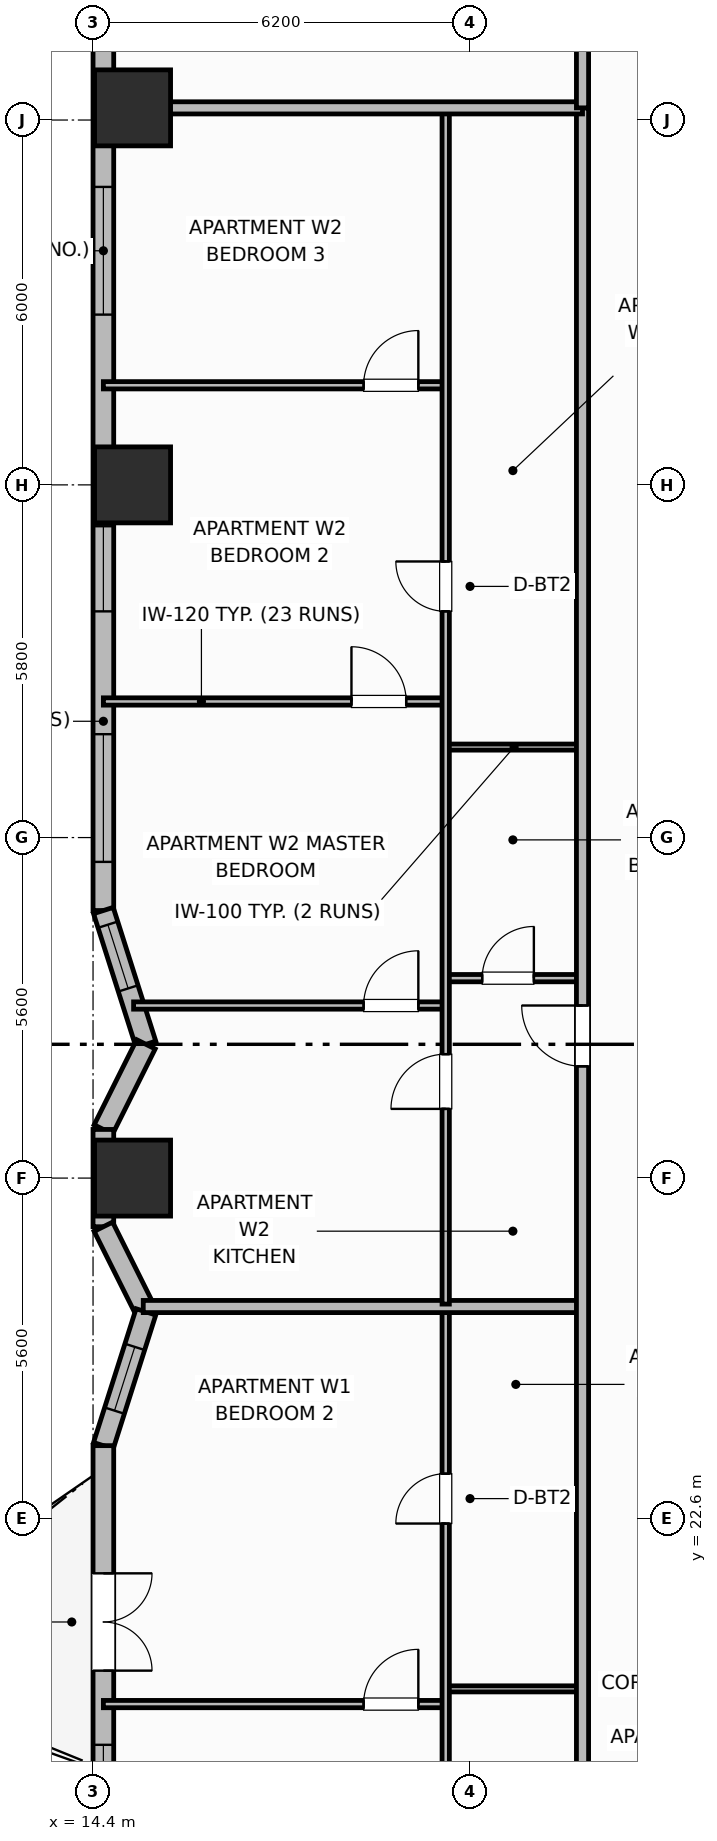
"""IFC4 building model, lengths in metres.
Left out: names, types, materials, properties, quantities, classifications, styles, units other than length and angle.
Written with IfcOpenShell. Run it as: python <this file> out.ifc"""

import sys

from ifc_helpers import new_model, si_unit, direction, frame, frame_2d, origin, origin_2d, place, context, subcontext, project, spatial, rectangle, extrude, element, fill, save


model = new_model("IFC4")
c1 = context("Model", 3, precision=1e-05, world=origin(), true_north=direction((0.0, 1.0)))
c2 = subcontext(c1, "Body", "Model", "MODEL_VIEW")
j1 = project(units=[si_unit("LENGTHUNIT", "METRE"), si_unit("PLANEANGLEUNIT", "RADIAN")], contexts=[c1])
p1 = place(None, origin())
s1 = spatial("IfcSite", under=j1, at=p1, CompositionType="ELEMENT")
p2 = place(p1, origin())
s2 = spatial("IfcBuilding", under=s1, at=p2, CompositionType="ELEMENT")
p3 = place(p2, frame((0.0, 0.0, 62.1)))
s3 = spatial("IfcBuildingStorey", under=s2, at=p3, CompositionType="ELEMENT", Elevation=62.1)
for number, where, z_axis, x_axis in (
    (1, (15.05, 28.2, 0.0), (0.0, 0.0, 1.0), (1.0, 0.0, 0.0)),
    (2, (15.05, 39.6, 0.0), (0.0, 0.0, 1.0), (1.0, 0.0, 0.0)),
    (3, (15.05, 45.8, 0.0), (0.0, 0.0, 1.0), (1.0, 0.0, 0.0)),
):
    element("IfcColumn", number, at=place(p3, frame(where, z_axis=z_axis, x_axis=x_axis)), inside=s3, PredefinedType="COLUMN", context=c2, shape_type="SweptSolid", body=[
        extrude(rectangle(XDim=1.25, YDim=1.25, at=origin_2d()), origin(), (0.0, 0.0, 1.0), 3.7),
    ])
p4 = place(p3, frame((14.57, 47.4, 0.0), z_axis=(0.0, 0.0, 1.0), x_axis=(0.0, -1.0, 0.0)))
e4 = element("IfcWall", 4, at=p4, inside=s3, PredefinedType="SOLIDWALL", context=c2, shape_type="SweptSolid", body=[
    extrude(rectangle(XDim=14.8, YDim=0.34, at=frame_2d((7.4, 0.0))), origin(), (0.0, 0.0, 1.0), 2.7),
])
p5 = place(p4, frame((2.9, 0.0, 0.68)))
e5 = element("IfcOpeningElement", 5, at=p5, cuts=e4, PredefinedType="OPENING", context=c2, shape_type="SweptSolid", body=[
    extrude(rectangle(XDim=2.1, YDim=1.9, at=frame_2d((1.05, 0.95))), frame((0.0, 0.18, 0.0), z_axis=(0.0, -1.0, 0.0), x_axis=(1.0, 0.0, 0.0)), (0.0, 0.0, 1.0), 0.36),
])
p6 = place(p4, frame((8.48, 0.0, 0.69)))
e6 = element("IfcOpeningElement", 6, at=p6, cuts=e4, PredefinedType="OPENING", context=c2, shape_type="SweptSolid", body=[
    extrude(rectangle(XDim=1.4, YDim=1.85, at=frame_2d((0.7, 0.925))), frame((0.0, 0.18, 0.0), z_axis=(0.0, -1.0, 0.0), x_axis=(1.0, 0.0, 0.0)), (0.0, 0.0, 1.0), 0.36),
])
p7 = place(p4, frame((11.9, 0.0, 0.68)))
e7 = element("IfcOpeningElement", 7, at=p7, cuts=e4, PredefinedType="OPENING", context=c2, shape_type="SweptSolid", body=[
    extrude(rectangle(XDim=2.1, YDim=1.9, at=frame_2d((1.05, 0.95))), frame((0.0, 0.18, 0.0), z_axis=(0.0, -1.0, 0.0), x_axis=(1.0, 0.0, 0.0)), (0.0, 0.0, 1.0), 0.36),
])
p8 = place(p3, frame((14.57, 32.6, 0.0), z_axis=(0.0, 0.0, 1.0), x_axis=(0.303160011437, -0.952939666225, 0.0)))
e8 = element("IfcWall", 8, at=p8, inside=s3, PredefinedType="SOLIDWALL", context=c2, shape_type="SweptSolid", body=[
    extrude(rectangle(XDim=2.309, YDim=0.34, at=frame_2d((1.154, 0.0))), origin(), (0.0, 0.0, 1.0), 2.7),
])
p9 = place(p8, frame((0.244, 0.0, 0.89)))
e9 = element("IfcOpeningElement", 9, at=p9, cuts=e8, PredefinedType="OPENING", context=c2, shape_type="SweptSolid", body=[
    extrude(rectangle(XDim=1.1, YDim=1.65, at=frame_2d((0.55, 0.825))), frame((0.0, 0.18, 0.0), z_axis=(0.0, -1.0, 0.0), x_axis=(1.0, 0.0, 0.0)), (0.0, 0.0, 1.0), 0.36),
])
p10 = place(p3, frame((15.27, 30.4, 0.0), z_axis=(0.0, 0.0, 1.0), x_axis=(-0.4472135955, -0.894427191, 0.0)))
e10 = element("IfcWall", 10, at=p10, inside=s3, PredefinedType="SOLIDWALL", context=c2, shape_type="SweptSolid", body=[
    extrude(rectangle(XDim=1.565, YDim=0.34, at=frame_2d((0.783, 0.0))), origin(), (0.0, 0.0, 1.0), 2.7),
])
p11 = place(p3, frame((14.57, 29.0, 0.0), z_axis=(0.0, 0.0, 1.0), x_axis=(0.0, -1.0, 0.0)))
e11 = element("IfcWall", 11, at=p11, inside=s3, PredefinedType="SOLIDWALL", context=c2, shape_type="SweptSolid", body=[
    extrude(rectangle(XDim=1.6, YDim=0.34, at=frame_2d((0.8, 0.0))), origin(), (0.0, 0.0, 1.0), 2.7),
])
p12 = place(p3, frame((14.57, 27.4, 0.0), z_axis=(0.0, 0.0, 1.0), x_axis=(0.4472135955, -0.894427191, 0.0)))
e12 = element("IfcWall", 12, at=p12, inside=s3, PredefinedType="SOLIDWALL", context=c2, shape_type="SweptSolid", body=[
    extrude(rectangle(XDim=1.565, YDim=0.34, at=frame_2d((0.783, 0.0))), origin(), (0.0, 0.0, 1.0), 2.7),
])
p13 = place(p3, frame((15.27, 26.0, 0.0), z_axis=(0.0, 0.0, 1.0), x_axis=(-0.303190562272, -0.952929946507, 0.0)))
e13 = element("IfcWall", 13, at=p13, inside=s3, PredefinedType="SOLIDWALL", context=c2, shape_type="SweptSolid", body=[
    extrude(rectangle(XDim=2.309, YDim=0.34, at=frame_2d((1.154, 0.0))), origin(), (0.0, 0.0, 1.0), 2.7),
])
p14 = place(p13, frame((0.604, 0.0, 0.89)))
e14 = element("IfcOpeningElement", 14, at=p14, cuts=e13, PredefinedType="OPENING", context=c2, shape_type="SweptSolid", body=[
    extrude(rectangle(XDim=1.1, YDim=1.65, at=frame_2d((0.55, 0.825))), frame((0.0, 0.18, 0.0), z_axis=(0.0, -1.0, 0.0), x_axis=(1.0, 0.0, 0.0)), (0.0, 0.0, 1.0), 0.36),
])
p15 = place(p3, frame((14.57, 23.8, 0.0), z_axis=(0.0, 0.0, 1.0), x_axis=(0.0, -1.0, 0.0)))
e15 = element("IfcWall", 15, at=p15, inside=s3, PredefinedType="SOLIDWALL", context=c2, shape_type="SweptSolid", body=[
    extrude(rectangle(XDim=14.8, YDim=0.34, at=frame_2d((7.4, 0.0))), origin(), (0.0, 0.0, 1.0), 2.7),
])
p16 = place(p15, frame((2.1, 0.0, 0.0)))
e16 = element("IfcOpeningElement", 16, at=p16, cuts=e15, PredefinedType="OPENING", context=c2, shape_type="SweptSolid", body=[
    extrude(rectangle(XDim=1.6, YDim=2.1, at=frame_2d((0.8, 1.05))), frame((0.0, 0.18, 0.0), z_axis=(0.0, -1.0, 0.0), x_axis=(1.0, 0.0, 0.0)), (0.0, 0.0, 1.0), 0.36),
])
p17 = place(p15, frame((4.92, 0.0, 0.69)))
e17 = element("IfcOpeningElement", 17, at=p17, cuts=e15, PredefinedType="OPENING", context=c2, shape_type="SweptSolid", body=[
    extrude(rectangle(XDim=1.4, YDim=1.85, at=frame_2d((0.7, 0.925))), frame((0.0, 0.18, 0.0), z_axis=(0.0, -1.0, 0.0), x_axis=(1.0, 0.0, 0.0)), (0.0, 0.0, 1.0), 0.36),
])
p18 = place(p15, frame((9.95, 0.0, 0.73)))
e18 = element("IfcOpeningElement", 18, at=p18, cuts=e15, PredefinedType="OPENING", context=c2, shape_type="SweptSolid", body=[
    extrude(rectangle(XDim=1.8, YDim=1.85, at=frame_2d((0.9, 0.925))), frame((0.0, 0.18, 0.0), z_axis=(0.0, -1.0, 0.0), x_axis=(1.0, 0.0, 0.0)), (0.0, 0.0, 1.0), 0.36),
])
p19 = place(p3, frame((20.2, 19.8, 0.0), z_axis=(0.0, 0.0, 1.0), x_axis=(1.0, 0.0, 0.0)))
e19 = element("IfcWall", 19, at=p19, inside=s3, PredefinedType="PARTITIONING", context=c2, shape_type="SweptSolid", body=[
    extrude(rectangle(XDim=2.25, YDim=0.1, at=frame_2d((1.125, 0.0))), origin(), (0.0, 0.0, 1.0), 2.53),
])
p20 = place(p3, frame((14.57, 19.55, 0.0), z_axis=(0.0, 0.0, 1.0), x_axis=(1.0, 0.0, 0.0)))
e20 = element("IfcWall", 20, at=p20, inside=s3, PredefinedType="PARTITIONING", context=c2, shape_type="SweptSolid", body=[
    extrude(rectangle(XDim=5.63, YDim=0.12, at=frame_2d((2.815, 0.0))), origin(), (0.0, 0.0, 1.0), 2.53),
])
p21 = place(p20, frame((4.28, 0.0, 0.0)))
e21 = element("IfcOpeningElement", 21, at=p21, cuts=e20, PredefinedType="OPENING", context=c2, shape_type="SweptSolid", body=[
    extrude(rectangle(XDim=0.9, YDim=2.1, at=frame_2d((0.45, 1.05))), frame((0.0, 0.07, 0.0), z_axis=(0.0, -1.0, 0.0), x_axis=(1.0, 0.0, 0.0)), (0.0, 0.0, 1.0), 0.14),
])
p22 = place(p3, frame((20.2, 10.64, 0.0), z_axis=(0.0, 0.0, 1.0), x_axis=(0.0, 1.0, 0.0)))
e22 = element("IfcWall", 22, at=p22, inside=s3, PredefinedType="PARTITIONING", context=c2, shape_type="SweptSolid", body=[
    extrude(rectangle(XDim=15.408, YDim=0.12, at=frame_2d((7.704, 0.0))), origin(), (0.0, 0.0, 1.0), 2.53),
])
p23 = place(p22, frame((0.41, 0.0, 0.0)))
e23 = element("IfcOpeningElement", 23, at=p23, cuts=e22, PredefinedType="OPENING", context=c2, shape_type="SweptSolid", body=[
    extrude(rectangle(XDim=0.9, YDim=2.1, at=frame_2d((0.45, 1.05))), frame((0.0, 0.07, 0.0), z_axis=(0.0, -1.0, 0.0), x_axis=(1.0, 0.0, 0.0)), (0.0, 0.0, 1.0), 0.14),
])
p24 = place(p22, frame((11.879, 0.0, 0.0)))
e24 = element("IfcOpeningElement", 24, at=p24, cuts=e22, PredefinedType="OPENING", context=c2, shape_type="SweptSolid", body=[
    extrude(rectangle(XDim=0.82, YDim=2.08, at=frame_2d((0.41, 1.04))), frame((0.0, 0.07, 0.0), z_axis=(0.0, -1.0, 0.0), x_axis=(1.0, 0.0, 0.0)), (0.0, 0.0, 1.0), 0.14),
])
p25 = place(p3, frame((15.226, 26.088, 0.0), z_axis=(0.0, 0.0, 1.0), x_axis=(1.0, 0.0, 0.0)))
e25 = element("IfcWall", 25, at=p25, inside=s3, PredefinedType="PARTITIONING", context=c2, shape_type="SweptSolid", body=[
    extrude(rectangle(XDim=7.224, YDim=0.2, at=frame_2d((3.612, 0.0))), origin(), (0.0, 0.0, 1.0), 2.53),
])
p26 = place(p3, frame((20.2, 31.488, 0.0), z_axis=(0.0, 0.0, 1.0), x_axis=(1.0, 0.0, 0.0)))
e26 = element("IfcWall", 26, at=p26, inside=s3, PredefinedType="PARTITIONING", context=c2, shape_type="SweptSolid", body=[
    extrude(rectangle(XDim=2.25, YDim=0.12, at=frame_2d((1.125, 0.0))), origin(), (0.0, 0.0, 1.0), 2.53),
])
p27 = place(p26, frame((0.6, 0.0, 0.0)))
e27 = element("IfcOpeningElement", 27, at=p27, cuts=e26, PredefinedType="OPENING", context=c2, shape_type="SweptSolid", body=[
    extrude(rectangle(XDim=0.85, YDim=2.1, at=frame_2d((0.425, 1.05))), frame((0.0, 0.07, 0.0), z_axis=(0.0, -1.0, 0.0), x_axis=(1.0, 0.0, 0.0)), (0.0, 0.0, 1.0), 0.14),
])
p28 = place(p3, frame((20.2, 35.288, 0.0), z_axis=(0.0, 0.0, 1.0), x_axis=(1.0, 0.0, 0.0)))
e28 = element("IfcWall", 28, at=p28, inside=s3, PredefinedType="PARTITIONING", context=c2, shape_type="SweptSolid", body=[
    extrude(rectangle(XDim=2.25, YDim=0.1, at=frame_2d((1.125, 0.0))), origin(), (0.0, 0.0, 1.0), 2.53),
])
p29 = place(p3, frame((15.067, 31.038, 0.0), z_axis=(0.0, 0.0, 1.0), x_axis=(1.0, 0.0, 0.0)))
e29 = element("IfcWall", 29, at=p29, inside=s3, PredefinedType="PARTITIONING", context=c2, shape_type="SweptSolid", body=[
    extrude(rectangle(XDim=5.133, YDim=0.12, at=frame_2d((2.566, 0.0))), origin(), (0.0, 0.0, 1.0), 2.53),
])
p30 = place(p29, frame((3.783, 0.0, 0.0)))
e30 = element("IfcOpeningElement", 30, at=p30, cuts=e29, PredefinedType="OPENING", context=c2, shape_type="SweptSolid", body=[
    extrude(rectangle(XDim=0.9, YDim=2.1, at=frame_2d((0.45, 1.05))), frame((0.0, 0.07, 0.0), z_axis=(0.0, -1.0, 0.0), x_axis=(1.0, 0.0, 0.0)), (0.0, 0.0, 1.0), 0.14),
])
p31 = place(p3, frame((14.57, 36.038, 0.0), z_axis=(0.0, 0.0, 1.0), x_axis=(1.0, 0.0, 0.0)))
e31 = element("IfcWall", 31, at=p31, inside=s3, PredefinedType="PARTITIONING", context=c2, shape_type="SweptSolid", body=[
    extrude(rectangle(XDim=5.63, YDim=0.12, at=frame_2d((2.815, 0.0))), origin(), (0.0, 0.0, 1.0), 2.53),
])
p32 = place(p31, frame((4.08, 0.0, 0.0)))
e32 = element("IfcOpeningElement", 32, at=p32, cuts=e31, PredefinedType="OPENING", context=c2, shape_type="SweptSolid", body=[
    extrude(rectangle(XDim=0.9, YDim=2.1, at=frame_2d((0.45, 1.05))), frame((0.0, 0.07, 0.0), z_axis=(0.0, -1.0, 0.0), x_axis=(1.0, 0.0, 0.0)), (0.0, 0.0, 1.0), 0.14),
])
p33 = place(p3, frame((14.57, 41.238, 0.0), z_axis=(0.0, 0.0, 1.0), x_axis=(1.0, 0.0, 0.0)))
e33 = element("IfcWall", 33, at=p33, inside=s3, PredefinedType="PARTITIONING", context=c2, shape_type="SweptSolid", body=[
    extrude(rectangle(XDim=5.63, YDim=0.12, at=frame_2d((2.815, 0.0))), origin(), (0.0, 0.0, 1.0), 2.53),
])
p34 = place(p33, frame((4.28, 0.0, 0.0)))
e34 = element("IfcOpeningElement", 34, at=p34, cuts=e33, PredefinedType="OPENING", context=c2, shape_type="SweptSolid", body=[
    extrude(rectangle(XDim=0.9, YDim=2.1, at=frame_2d((0.45, 1.05))), frame((0.0, 0.07, 0.0), z_axis=(0.0, -1.0, 0.0), x_axis=(1.0, 0.0, 0.0)), (0.0, 0.0, 1.0), 0.14),
])
p35 = place(p3, frame((20.2, 26.128, 0.0), z_axis=(0.0, 0.0, 1.0), x_axis=(0.0, 1.0, 0.0)))
e35 = element("IfcWall", 35, at=p35, inside=s3, PredefinedType="PARTITIONING", context=c2, shape_type="SweptSolid", body=[
    extrude(rectangle(XDim=19.632, YDim=0.12, at=frame_2d((9.816, 0.0))), origin(), (0.0, 0.0, 1.0), 2.53),
])
p36 = place(p35, frame((3.21, 0.0, 0.0)))
e36 = element("IfcOpeningElement", 36, at=p36, cuts=e35, PredefinedType="OPENING", context=c2, shape_type="SweptSolid", body=[
    extrude(rectangle(XDim=0.9, YDim=2.1, at=frame_2d((0.45, 1.05))), frame((0.0, 0.07, 0.0), z_axis=(0.0, -1.0, 0.0), x_axis=(1.0, 0.0, 0.0)), (0.0, 0.0, 1.0), 0.14),
])
p37 = place(p35, frame((11.392, 0.0, 0.0)))
e37 = element("IfcOpeningElement", 37, at=p37, cuts=e35, PredefinedType="OPENING", context=c2, shape_type="SweptSolid", body=[
    extrude(rectangle(XDim=0.82, YDim=2.08, at=frame_2d((0.41, 1.04))), frame((0.0, 0.07, 0.0), z_axis=(0.0, -1.0, 0.0), x_axis=(1.0, 0.0, 0.0)), (0.0, 0.0, 1.0), 0.14),
])
p38 = place(p3, frame((22.45, 10.6, 0.0), z_axis=(0.0, 0.0, 1.0), x_axis=(0.0, 1.0, 0.0)))
e38 = element("IfcWall", 38, at=p38, inside=s3, PredefinedType="PARTITIONING", context=c2, shape_type="SweptSolid", body=[
    extrude(rectangle(XDim=35.2, YDim=0.2, at=frame_2d((17.6, 0.0))), origin(), (0.0, 0.0, 1.0), 2.53),
])
p39 = place(p38, frame((2.65, 0.0, 0.0)))
e39 = element("IfcOpeningElement", 39, at=p39, cuts=e38, PredefinedType="OPENING", context=c2, shape_type="SweptSolid", body=[
    extrude(rectangle(XDim=1.0, YDim=2.15, at=frame_2d((0.5, 1.075))), frame((0.0, 0.11, 0.0), z_axis=(0.0, -1.0, 0.0), x_axis=(1.0, 0.0, 0.0)), (0.0, 0.0, 1.0), 0.22),
])
p40 = place(p38, frame((19.438, 0.0, 0.0)))
e40 = element("IfcOpeningElement", 40, at=p40, cuts=e38, PredefinedType="OPENING", context=c2, shape_type="SweptSolid", body=[
    extrude(rectangle(XDim=1.0, YDim=2.15, at=frame_2d((0.5, 1.075))), frame((0.0, 0.11, 0.0), z_axis=(0.0, -1.0, 0.0), x_axis=(1.0, 0.0, 0.0)), (0.0, 0.0, 1.0), 0.22),
])
p41 = place(p3, frame((14.99, 45.8, 0.0), z_axis=(0.0, 0.0, 1.0), x_axis=(1.0, 0.0, 0.0)))
e41 = element("IfcWall", 41, at=p41, inside=s3, PredefinedType="PARTITIONING", context=c2, shape_type="SweptSolid", body=[
    extrude(rectangle(XDim=7.46, YDim=0.2, at=frame_2d((3.73, 0.0))), origin(), (0.0, 0.0, 1.0), 2.53),
])
p42 = place(p3, frame((22.45, 45.8, 0.0), z_axis=(0.0, 0.0, 1.0), x_axis=(0.0, 1.0, 0.0)))
e42 = element("IfcWall", 42, at=p42, inside=s3, PredefinedType="PARTITIONING", context=c2, shape_type="SweptSolid", body=[
    extrude(rectangle(XDim=5.63, YDim=0.2, at=frame_2d((2.815, 0.0))), origin(), (0.0, 0.0, 1.0), 2.53),
])
p43 = place(p5, origin())
e43 = element("IfcWindow", 43, at=p43, inside=s3, PartitioningType="SINGLE_PANEL", PredefinedType="WINDOW", context=c2, shape_type="SweptSolid", body=[
    extrude(rectangle(XDim=2.1, YDim=1.9, at=frame_2d((1.05, 0.95))), frame((0.0, 0.03, 0.0), z_axis=(0.0, -1.0, 0.0), x_axis=(1.0, 0.0, 0.0)), (0.0, 0.0, 1.0), 0.06),
])
fill(e5, e43)
p44 = place(p6, origin())
e44 = element("IfcWindow", 44, at=p44, inside=s3, PartitioningType="SINGLE_PANEL", PredefinedType="WINDOW", context=c2, shape_type="SweptSolid", body=[
    extrude(rectangle(XDim=1.4, YDim=1.85, at=frame_2d((0.7, 0.925))), frame((0.0, 0.03, 0.0), z_axis=(0.0, -1.0, 0.0), x_axis=(1.0, 0.0, 0.0)), (0.0, 0.0, 1.0), 0.06),
])
fill(e6, e44)
p45 = place(p7, origin())
e45 = element("IfcWindow", 45, at=p45, inside=s3, PartitioningType="SINGLE_PANEL", PredefinedType="WINDOW", context=c2, shape_type="SweptSolid", body=[
    extrude(rectangle(XDim=2.1, YDim=1.9, at=frame_2d((1.05, 0.95))), frame((0.0, 0.03, 0.0), z_axis=(0.0, -1.0, 0.0), x_axis=(1.0, 0.0, 0.0)), (0.0, 0.0, 1.0), 0.06),
])
fill(e7, e45)
p46 = place(p9, origin())
e46 = element("IfcWindow", 46, at=p46, inside=s3, PartitioningType="SINGLE_PANEL", PredefinedType="WINDOW", context=c2, shape_type="SweptSolid", body=[
    extrude(rectangle(XDim=1.1, YDim=1.65, at=frame_2d((0.55, 0.825))), frame((0.0, 0.03, 0.0), z_axis=(0.0, -1.0, 0.0), x_axis=(1.0, 0.0, 0.0)), (0.0, 0.0, 1.0), 0.06),
])
fill(e9, e46)
p47 = place(p14, origin())
e47 = element("IfcWindow", 47, at=p47, inside=s3, PartitioningType="SINGLE_PANEL", PredefinedType="WINDOW", context=c2, shape_type="SweptSolid", body=[
    extrude(rectangle(XDim=1.1, YDim=1.65, at=frame_2d((0.55, 0.825))), frame((0.0, 0.03, 0.0), z_axis=(0.0, -1.0, 0.0), x_axis=(1.0, 0.0, 0.0)), (0.0, 0.0, 1.0), 0.06),
])
fill(e14, e47)
p48 = place(p16, origin())
e48 = element("IfcDoor", 48, at=p48, inside=s3, OperationType="DOUBLE_DOOR_SINGLE_SWING", PredefinedType="DOOR", context=c2, shape_type="SweptSolid", body=[
    extrude(rectangle(XDim=1.6, YDim=2.1, at=frame_2d((0.8, 1.05))), frame((0.0, 0.025, 0.0), z_axis=(0.0, -1.0, 0.0), x_axis=(1.0, 0.0, 0.0)), (0.0, 0.0, 1.0), 0.05),
])
fill(e16, e48)
p49 = place(p17, origin())
e49 = element("IfcWindow", 49, at=p49, inside=s3, PartitioningType="SINGLE_PANEL", PredefinedType="WINDOW", context=c2, shape_type="SweptSolid", body=[
    extrude(rectangle(XDim=1.4, YDim=1.85, at=frame_2d((0.7, 0.925))), frame((0.0, 0.03, 0.0), z_axis=(0.0, -1.0, 0.0), x_axis=(1.0, 0.0, 0.0)), (0.0, 0.0, 1.0), 0.06),
])
fill(e17, e49)
p50 = place(p21, origin())
e50 = element("IfcDoor", 50, at=p50, inside=s3, OperationType="SINGLE_SWING_RIGHT", PredefinedType="DOOR", context=c2, shape_type="SweptSolid", body=[
    extrude(rectangle(XDim=0.9, YDim=2.1, at=frame_2d((0.45, 1.05))), frame((0.0, 0.025, 0.0), z_axis=(0.0, -1.0, 0.0), x_axis=(1.0, 0.0, 0.0)), (0.0, 0.0, 1.0), 0.05),
])
fill(e21, e50)
p51 = place(p24, origin())
e51 = element("IfcDoor", 51, at=p51, inside=s3, OperationType="SINGLE_SWING_LEFT", PredefinedType="DOOR", context=c2, shape_type="SweptSolid", body=[
    extrude(rectangle(XDim=0.82, YDim=2.08, at=frame_2d((0.41, 1.04))), frame((0.0, 0.025, 0.0), z_axis=(0.0, -1.0, 0.0), x_axis=(1.0, 0.0, 0.0)), (0.0, 0.0, 1.0), 0.05),
])
fill(e24, e51)
p52 = place(p27, origin())
e52 = element("IfcDoor", 52, at=p52, inside=s3, OperationType="SINGLE_SWING_RIGHT", PredefinedType="DOOR", context=c2, shape_type="SweptSolid", body=[
    extrude(rectangle(XDim=0.85, YDim=2.1, at=frame_2d((0.425, 1.05))), frame((0.0, 0.025, 0.0), z_axis=(0.0, -1.0, 0.0), x_axis=(1.0, 0.0, 0.0)), (0.0, 0.0, 1.0), 0.05),
])
fill(e27, e52)
p53 = place(p30, origin())
e53 = element("IfcDoor", 53, at=p53, inside=s3, OperationType="SINGLE_SWING_RIGHT", PredefinedType="DOOR", context=c2, shape_type="SweptSolid", body=[
    extrude(rectangle(XDim=0.9, YDim=2.1, at=frame_2d((0.45, 1.05))), frame((0.0, 0.025, 0.0), z_axis=(0.0, -1.0, 0.0), x_axis=(1.0, 0.0, 0.0)), (0.0, 0.0, 1.0), 0.05),
])
fill(e30, e53)
p54 = place(p32, origin())
e54 = element("IfcDoor", 54, at=p54, inside=s3, OperationType="SINGLE_SWING_LEFT", PredefinedType="DOOR", context=c2, shape_type="SweptSolid", body=[
    extrude(rectangle(XDim=0.9, YDim=2.1, at=frame_2d((0.45, 1.05))), frame((0.0, 0.025, 0.0), z_axis=(0.0, -1.0, 0.0), x_axis=(1.0, 0.0, 0.0)), (0.0, 0.0, 1.0), 0.05),
])
fill(e32, e54)
p55 = place(p34, origin())
e55 = element("IfcDoor", 55, at=p55, inside=s3, OperationType="SINGLE_SWING_RIGHT", PredefinedType="DOOR", context=c2, shape_type="SweptSolid", body=[
    extrude(rectangle(XDim=0.9, YDim=2.1, at=frame_2d((0.45, 1.05))), frame((0.0, 0.025, 0.0), z_axis=(0.0, -1.0, 0.0), x_axis=(1.0, 0.0, 0.0)), (0.0, 0.0, 1.0), 0.05),
])
fill(e34, e55)
p56 = place(p36, origin())
e56 = element("IfcDoor", 56, at=p56, inside=s3, OperationType="SINGLE_SWING_LEFT", PredefinedType="DOOR", context=c2, shape_type="SweptSolid", body=[
    extrude(rectangle(XDim=0.9, YDim=2.1, at=frame_2d((0.45, 1.05))), frame((0.0, 0.025, 0.0), z_axis=(0.0, -1.0, 0.0), x_axis=(1.0, 0.0, 0.0)), (0.0, 0.0, 1.0), 0.05),
])
fill(e36, e56)
p57 = place(p37, origin())
e57 = element("IfcDoor", 57, at=p57, inside=s3, OperationType="SINGLE_SWING_RIGHT", PredefinedType="DOOR", context=c2, shape_type="SweptSolid", body=[
    extrude(rectangle(XDim=0.82, YDim=2.08, at=frame_2d((0.41, 1.04))), frame((0.0, 0.025, 0.0), z_axis=(0.0, -1.0, 0.0), x_axis=(1.0, 0.0, 0.0)), (0.0, 0.0, 1.0), 0.05),
])
fill(e37, e57)
p58 = place(p40, origin())
e58 = element("IfcDoor", 58, at=p58, inside=s3, OperationType="SINGLE_SWING_RIGHT", PredefinedType="DOOR", context=c2, shape_type="SweptSolid", body=[
    extrude(rectangle(XDim=1.0, YDim=2.15, at=frame_2d((0.5, 1.075))), frame((0.0, 0.025, 0.0), z_axis=(0.0, -1.0, 0.0), x_axis=(1.0, 0.0, 0.0)), (0.0, 0.0, 1.0), 0.05),
])
fill(e40, e58)
save(model, sys.argv[1])
